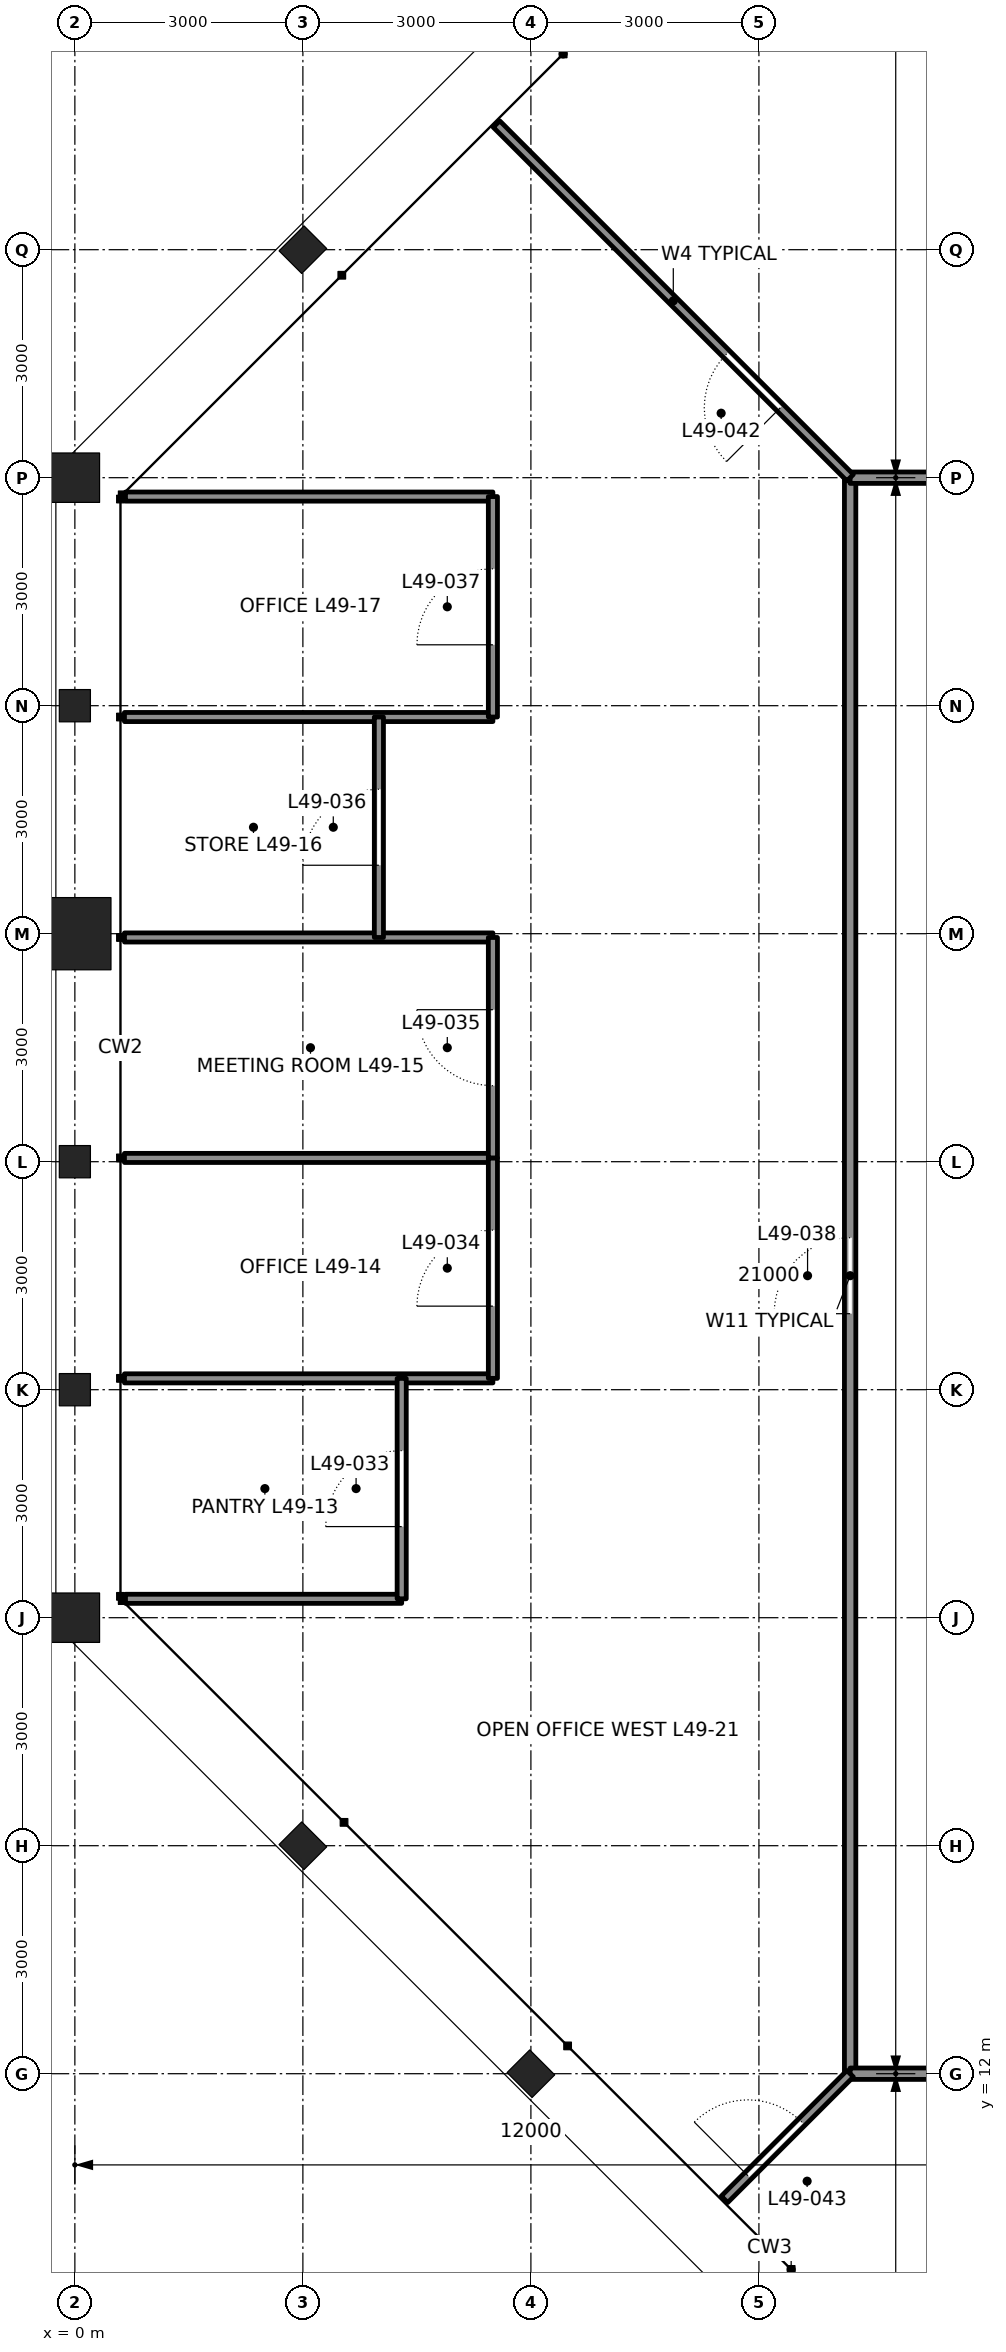
"""IFC4 building model, lengths in metres.
Left out: names, types, materials, properties, quantities, classifications, styles, units other than length and angle.
Written with IfcOpenShell. Run it as: python <this file> out.ifc"""

import sys

from ifc_helpers import new_model, si_unit, direction, frame, frame_2d, origin, origin_2d, place, context, subcontext, project, spatial, rectangle, hollow_rectangle, i_section, extrude, element, fill, save


model = new_model("IFC4")
c1 = context("Model", 3, precision=1e-05, world=origin(), true_north=direction((0.0, 1.0)))
c2 = subcontext(c1, "Body", "Model", "MODEL_VIEW")
j1 = project(units=[si_unit("LENGTHUNIT", "METRE"), si_unit("PLANEANGLEUNIT", "RADIAN")], contexts=[c1])
p1 = place(None, origin())
s1 = spatial("IfcSite", under=j1, at=p1, CompositionType="ELEMENT")
p2 = place(p1, origin())
s2 = spatial("IfcBuilding", under=s1, at=p2, CompositionType="ELEMENT")
p3 = place(p2, frame((0.0, 0.0, 222.3)))
s3 = spatial("IfcBuildingStorey", under=s2, at=p3, CompositionType="ELEMENT", Elevation=222.3)
p4 = place(p3, frame((3.0, 36.0, 0.0), z_axis=(0.0, 0.0, 1.0), x_axis=(-0.707106781187, 0.707106781187, 0.0)))
e1 = element("IfcColumn", 1, at=p4, inside=s3, PredefinedType="COLUMN", context=c2, shape_type="SweptSolid", body=[
    extrude(i_section(OverallWidth=0.422, OverallDepth=0.465, WebThickness=0.045, FlangeThickness=0.073, at=origin_2d()), origin(), (0.0, 0.0, 1.0), 4.2),
])
p5 = place(p3, frame((0.0, 33.0, 0.0), z_axis=(0.0, 0.0, 1.0), x_axis=(-1.0, 0.0, 0.0)))
e2 = element("IfcColumn", 2, at=p5, inside=s3, PredefinedType="COLUMN", context=c2, shape_type="SweptSolid", body=[
    extrude(hollow_rectangle(XDim=0.65, YDim=0.65, WallThickness=0.065, at=origin_2d()), origin(), (0.0, 0.0, 1.0), 4.2),
])
p6 = place(p3, frame((0.0, 30.0, 0.0), z_axis=(0.0, 0.0, 1.0), x_axis=(-1.0, 0.0, 0.0)))
e3 = element("IfcColumn", 3, at=p6, inside=s3, PredefinedType="COLUMN", context=c2, shape_type="SweptSolid", body=[
    extrude(i_section(OverallWidth=0.409, OverallDepth=0.424, WebThickness=0.033, FlangeThickness=0.052, at=origin_2d()), origin(), (0.0, 0.0, 1.0), 4.2),
])
p7 = place(p3, frame((0.0, 27.0, 0.0), z_axis=(0.0, 0.0, 1.0), x_axis=(-1.0, 0.0, 0.0)))
e4 = element("IfcColumn", 4, at=p7, inside=s3, PredefinedType="COLUMN", context=c2, shape_type="SweptSolid", body=[
    extrude(hollow_rectangle(XDim=0.95, YDim=0.95, WallThickness=0.11, at=origin_2d()), origin(), (0.0, 0.0, 1.0), 4.2),
])
for number, where, z_axis, x_axis in (
    (5, (0.0, 24.0, 0.0), (0.0, 0.0, 1.0), (-1.0, 0.0, 0.0)),
    (6, (0.0, 21.0, 0.0), (0.0, 0.0, 1.0), (-1.0, 0.0, 0.0)),
):
    element("IfcColumn", number, at=place(p3, frame(where, z_axis=z_axis, x_axis=x_axis)), inside=s3, PredefinedType="COLUMN", context=c2, shape_type="SweptSolid", body=[
        extrude(i_section(OverallWidth=0.409, OverallDepth=0.424, WebThickness=0.033, FlangeThickness=0.052, at=origin_2d()), origin(), (0.0, 0.0, 1.0), 4.2),
    ])
p8 = place(p3, frame((0.0, 18.0, 0.0), z_axis=(0.0, 0.0, 1.0), x_axis=(-1.0, 0.0, 0.0)))
e7 = element("IfcColumn", 7, at=p8, inside=s3, PredefinedType="COLUMN", context=c2, shape_type="SweptSolid", body=[
    extrude(hollow_rectangle(XDim=0.65, YDim=0.65, WallThickness=0.065, at=origin_2d()), origin(), (0.0, 0.0, 1.0), 4.2),
])
for number, where, z_axis, x_axis in (
    (8, (3.0, 15.0, 0.0), (0.0, 0.0, 1.0), (-0.707, -0.707, 0.0)),
    (9, (6.0, 12.0, 0.0), (0.0, 0.0, 1.0), (-0.707, -0.707, 0.0)),
):
    element("IfcColumn", number, at=place(p3, frame(where, z_axis=z_axis, x_axis=x_axis)), inside=s3, PredefinedType="COLUMN", context=c2, shape_type="SweptSolid", body=[
        extrude(i_section(OverallWidth=0.422, OverallDepth=0.465, WebThickness=0.045, FlangeThickness=0.073, at=origin_2d()), origin(), (0.0, 0.0, 1.0), 4.2),
    ])
p9 = place(p3, frame((0.666, 18.249, 0.0), z_axis=(0.0, 0.0, 1.0), x_axis=(1.0, 0.0, 0.0)))
e10 = element("IfcWall", 10, at=p9, inside=s3, PredefinedType="PARTITIONING", context=c2, shape_type="SweptSolid", body=[
    extrude(rectangle(XDim=3.634, YDim=0.12, at=frame_2d((1.817, 0.0))), origin(), (0.0, 0.0, 1.0), 4.04),
])
p10 = place(p3, frame((0.653, 21.149, 0.0), z_axis=(0.0, 0.0, 1.0), x_axis=(1.0, 0.0, 0.0)))
e11 = element("IfcWall", 11, at=p10, inside=s3, PredefinedType="PARTITIONING", context=c2, shape_type="SweptSolid", body=[
    extrude(rectangle(XDim=4.847, YDim=0.12, at=frame_2d((2.424, 0.0))), origin(), (0.0, 0.0, 1.0), 4.04),
])
for number, where, z_axis, x_axis in (
    (12, (0.653, 24.05, 0.0), (0.0, 0.0, 1.0), (1.0, 0.0, 0.0)),
    (13, (0.653, 26.95, 0.0), (0.0, 0.0, 1.0), (1.0, 0.0, 0.0)),
):
    element("IfcWall", number, at=place(p3, frame(where, z_axis=z_axis, x_axis=x_axis)), inside=s3, PredefinedType="PARTITIONING", context=c2, shape_type="SweptSolid", body=[
        extrude(rectangle(XDim=4.847, YDim=0.12, at=frame_2d((2.424, 0.0))), origin(), (0.0, 0.0, 1.0), 3.357),
    ])
p11 = place(p3, frame((0.653, 29.851, 0.0), z_axis=(0.0, 0.0, 1.0), x_axis=(1.0, 0.0, 0.0)))
e14 = element("IfcWall", 14, at=p11, inside=s3, PredefinedType="PARTITIONING", context=c2, shape_type="SweptSolid", body=[
    extrude(rectangle(XDim=4.847, YDim=0.12, at=frame_2d((2.424, 0.0))), origin(), (0.0, 0.0, 1.0), 4.04),
])
p12 = place(p3, frame((0.666, 32.751, 0.0), z_axis=(0.0, 0.0, 1.0), x_axis=(1.0, 0.0, 0.0)))
e15 = element("IfcWall", 15, at=p12, inside=s3, PredefinedType="PARTITIONING", context=c2, shape_type="SweptSolid", body=[
    extrude(rectangle(XDim=4.834, YDim=0.12, at=frame_2d((2.417, 0.0))), origin(), (0.0, 0.0, 1.0), 4.04),
])
p13 = place(p3, frame((4.3, 18.249, 0.0), z_axis=(0.0, 0.0, 1.0), x_axis=(0.0, 1.0, 0.0)))
e16 = element("IfcWall", 16, at=p13, inside=s3, PredefinedType="PARTITIONING", context=c2, shape_type="SweptSolid", body=[
    extrude(rectangle(XDim=2.901, YDim=0.12, at=frame_2d((1.45, 0.0))), origin(), (0.0, 0.0, 1.0), 4.04),
])
p14 = place(p13, frame((0.95, 0.0, 0.0)))
e17 = element("IfcOpeningElement", 17, at=p14, cuts=e16, PredefinedType="OPENING", context=c2, shape_type="SweptSolid", body=[
    extrude(rectangle(XDim=1.0, YDim=2.4, at=frame_2d((0.5, 1.2))), frame((0.0, 0.07, 0.0), z_axis=(0.0, -1.0, 0.0), x_axis=(1.0, 0.0, 0.0)), (0.0, 0.0, 1.0), 0.14),
])
p15 = place(p3, frame((5.5, 21.149, 0.0), z_axis=(0.0, 0.0, 1.0), x_axis=(0.0, 1.0, 0.0)))
e18 = element("IfcWall", 18, at=p15, inside=s3, PredefinedType="PARTITIONING", context=c2, shape_type="SweptSolid", body=[
    extrude(rectangle(XDim=2.901, YDim=0.12, at=frame_2d((1.45, 0.0))), origin(), (0.0, 0.0, 1.0), 4.04),
])
p16 = place(p15, frame((0.95, 0.0, 0.0)))
e19 = element("IfcOpeningElement", 19, at=p16, cuts=e18, PredefinedType="OPENING", context=c2, shape_type="SweptSolid", body=[
    extrude(rectangle(XDim=1.0, YDim=2.4, at=frame_2d((0.5, 1.2))), frame((0.0, 0.07, 0.0), z_axis=(0.0, -1.0, 0.0), x_axis=(1.0, 0.0, 0.0)), (0.0, 0.0, 1.0), 0.14),
])
p17 = place(p3, frame((5.5, 24.05, 0.0), z_axis=(0.0, 0.0, 1.0), x_axis=(0.0, 1.0, 0.0)))
e20 = element("IfcWall", 20, at=p17, inside=s3, PredefinedType="PARTITIONING", context=c2, shape_type="SweptSolid", body=[
    extrude(rectangle(XDim=2.9, YDim=0.12, at=frame_2d((1.45, 0.0))), origin(), (0.0, 0.0, 1.0), 4.04),
])
p18 = place(p17, frame((0.95, 0.0, 0.0)))
e21 = element("IfcOpeningElement", 21, at=p18, cuts=e20, PredefinedType="OPENING", context=c2, shape_type="SweptSolid", body=[
    extrude(rectangle(XDim=1.0, YDim=2.4, at=frame_2d((0.5, 1.2))), frame((0.0, 0.07, 0.0), z_axis=(0.0, -1.0, 0.0), x_axis=(1.0, 0.0, 0.0)), (0.0, 0.0, 1.0), 0.14),
])
p19 = place(p3, frame((4.0, 26.95, 0.0), z_axis=(0.0, 0.0, 1.0), x_axis=(0.0, 1.0, 0.0)))
e22 = element("IfcWall", 22, at=p19, inside=s3, PredefinedType="PARTITIONING", context=c2, shape_type="SweptSolid", body=[
    extrude(rectangle(XDim=2.901, YDim=0.12, at=frame_2d((1.45, 0.0))), origin(), (0.0, 0.0, 1.0), 4.04),
])
p20 = place(p19, frame((0.95, 0.0, 0.0)))
e23 = element("IfcOpeningElement", 23, at=p20, cuts=e22, PredefinedType="OPENING", context=c2, shape_type="SweptSolid", body=[
    extrude(rectangle(XDim=1.0, YDim=2.4, at=frame_2d((0.5, 1.2))), frame((0.0, 0.07, 0.0), z_axis=(0.0, -1.0, 0.0), x_axis=(1.0, 0.0, 0.0)), (0.0, 0.0, 1.0), 0.14),
])
p21 = place(p3, frame((5.5, 29.851, 0.0), z_axis=(0.0, 0.0, 1.0), x_axis=(0.0, 1.0, 0.0)))
e24 = element("IfcWall", 24, at=p21, inside=s3, PredefinedType="PARTITIONING", context=c2, shape_type="SweptSolid", body=[
    extrude(rectangle(XDim=2.901, YDim=0.12, at=frame_2d((1.45, 0.0))), origin(), (0.0, 0.0, 1.0), 4.04),
])
p22 = place(p21, frame((0.95, 0.0, 0.0)))
e25 = element("IfcOpeningElement", 25, at=p22, cuts=e24, PredefinedType="OPENING", context=c2, shape_type="SweptSolid", body=[
    extrude(rectangle(XDim=1.0, YDim=2.4, at=frame_2d((0.5, 1.2))), frame((0.0, 0.07, 0.0), z_axis=(0.0, -1.0, 0.0), x_axis=(1.0, 0.0, 0.0)), (0.0, 0.0, 1.0), 0.14),
])
p23 = place(p3, frame((10.2, 12.0, 0.0), z_axis=(0.0, 0.0, 1.0), x_axis=(0.0, 1.0, 0.0)))
e26 = element("IfcWall", 26, at=p23, inside=s3, PredefinedType="PARTITIONING", context=c2, shape_type="SweptSolid", body=[
    extrude(rectangle(XDim=21.0, YDim=0.15, at=frame_2d((10.5, 0.0))), origin(), (0.0, 0.0, 1.0), 4.04),
])
p24 = place(p23, frame((10.0, 0.0, 0.0)))
e27 = element("IfcOpeningElement", 27, at=p24, cuts=e26, PredefinedType="OPENING", context=c2, shape_type="SweptSolid", body=[
    extrude(rectangle(XDim=1.0, YDim=2.4, at=frame_2d((0.5, 1.2))), frame((0.0, 0.085, 0.0), z_axis=(0.0, -1.0, 0.0), x_axis=(1.0, 0.0, 0.0)), (0.0, 0.0, 1.0), 0.17),
])
for number, where, z_axis, x_axis in (
    (28, (10.2, 33.0, 0.0), (0.0, 0.0, 1.0), (1.0, 0.0, 0.0)),
    (29, (10.2, 12.0, 0.0), (0.0, 0.0, 1.0), (1.0, 0.0, 0.0)),
):
    element("IfcWall", number, at=place(p3, frame(where, z_axis=z_axis, x_axis=x_axis)), inside=s3, PredefinedType="PARTITIONING", context=c2, shape_type="SweptSolid", body=[
        extrude(rectangle(XDim=1.8, YDim=0.15, at=frame_2d((0.9, 0.0))), origin(), (0.0, 0.0, 1.0), 3.27),
    ])
p25 = place(p3, frame((10.2, 33.0, 0.0), z_axis=(0.0, 0.0, 1.0), x_axis=(-0.707106781187, 0.707106781187, 0.0)))
e30 = element("IfcWall", 30, at=p25, inside=s3, PredefinedType="PARTITIONING", context=c2, shape_type="SweptSolid", body=[
    extrude(rectangle(XDim=6.58, YDim=0.12, at=frame_2d((3.29, 0.0))), origin(), (0.0, 0.0, 1.0), 4.04),
])
p26 = place(p25, frame((1.3, 0.0, 0.0)))
e31 = element("IfcOpeningElement", 31, at=p26, cuts=e30, PredefinedType="OPENING", context=c2, shape_type="SweptSolid", body=[
    extrude(rectangle(XDim=1.0, YDim=2.4, at=frame_2d((0.5, 1.2))), frame((0.0, 0.07, 0.0), z_axis=(0.0, -1.0, 0.0), x_axis=(1.0, 0.0, 0.0)), (0.0, 0.0, 1.0), 0.14),
])
p27 = place(p3, frame((10.2, 12.0, 0.0), z_axis=(0.0, 0.0, 1.0), x_axis=(-0.707106781187, -0.707106781187, 0.0)))
e32 = element("IfcWall", 32, at=p27, inside=s3, PredefinedType="PARTITIONING", context=c2, shape_type="SweptSolid", body=[
    extrude(rectangle(XDim=2.338, YDim=0.12, at=frame_2d((1.169, 0.0))), origin(), (0.0, 0.0, 1.0), 4.04),
])
p28 = place(p27, frame((0.9, 0.0, 0.0)))
e33 = element("IfcOpeningElement", 33, at=p28, cuts=e32, PredefinedType="OPENING", context=c2, shape_type="SweptSolid", body=[
    extrude(rectangle(XDim=1.0, YDim=2.4, at=frame_2d((0.5, 1.2))), frame((0.0, 0.07, 0.0), z_axis=(0.0, -1.0, 0.0), x_axis=(1.0, 0.0, 0.0)), (0.0, 0.0, 1.0), 0.14),
])
p29 = place(p14, origin())
e34 = element("IfcDoor", 34, at=p29, inside=s3, OperationType="SINGLE_SWING_LEFT", PredefinedType="DOOR", context=c2, shape_type="SweptSolid", body=[
    extrude(rectangle(XDim=1.0, YDim=2.4, at=frame_2d((0.5, 1.2))), frame((0.0, 0.025, 0.0), z_axis=(0.0, -1.0, 0.0), x_axis=(1.0, 0.0, 0.0)), (0.0, 0.0, 1.0), 0.05),
])
fill(e17, e34)
p30 = place(p16, origin())
e35 = element("IfcDoor", 35, at=p30, inside=s3, OperationType="SINGLE_SWING_LEFT", PredefinedType="DOOR", context=c2, shape_type="SweptSolid", body=[
    extrude(rectangle(XDim=1.0, YDim=2.4, at=frame_2d((0.5, 1.2))), frame((0.0, 0.025, 0.0), z_axis=(0.0, -1.0, 0.0), x_axis=(1.0, 0.0, 0.0)), (0.0, 0.0, 1.0), 0.05),
])
fill(e19, e35)
p31 = place(p18, origin())
e36 = element("IfcDoor", 36, at=p31, inside=s3, OperationType="SINGLE_SWING_RIGHT", PredefinedType="DOOR", context=c2, shape_type="SweptSolid", body=[
    extrude(rectangle(XDim=1.0, YDim=2.4, at=frame_2d((0.5, 1.2))), frame((0.0, 0.025, 0.0), z_axis=(0.0, -1.0, 0.0), x_axis=(1.0, 0.0, 0.0)), (0.0, 0.0, 1.0), 0.05),
])
fill(e21, e36)
p32 = place(p20, origin())
e37 = element("IfcDoor", 37, at=p32, inside=s3, OperationType="SINGLE_SWING_LEFT", PredefinedType="DOOR", context=c2, shape_type="SweptSolid", body=[
    extrude(rectangle(XDim=1.0, YDim=2.4, at=frame_2d((0.5, 1.2))), frame((0.0, 0.025, 0.0), z_axis=(0.0, -1.0, 0.0), x_axis=(1.0, 0.0, 0.0)), (0.0, 0.0, 1.0), 0.05),
])
fill(e23, e37)
p33 = place(p22, origin())
e38 = element("IfcDoor", 38, at=p33, inside=s3, OperationType="SINGLE_SWING_LEFT", PredefinedType="DOOR", context=c2, shape_type="SweptSolid", body=[
    extrude(rectangle(XDim=1.0, YDim=2.4, at=frame_2d((0.5, 1.2))), frame((0.0, 0.025, 0.0), z_axis=(0.0, -1.0, 0.0), x_axis=(1.0, 0.0, 0.0)), (0.0, 0.0, 1.0), 0.05),
])
fill(e25, e38)
p34 = place(p24, origin())
e39 = element("IfcDoor", 39, at=p34, inside=s3, OperationType="SINGLE_SWING_LEFT", PredefinedType="DOOR", context=c2, shape_type="SweptSolid", body=[
    extrude(rectangle(XDim=1.0, YDim=2.4, at=frame_2d((0.5, 1.2))), frame((0.0, 0.025, 0.0), z_axis=(0.0, -1.0, 0.0), x_axis=(1.0, 0.0, 0.0)), (0.0, 0.0, 1.0), 0.05),
])
fill(e27, e39)
p35 = place(p26, origin())
e40 = element("IfcDoor", 40, at=p35, inside=s3, OperationType="SINGLE_SWING_LEFT", PredefinedType="DOOR", context=c2, shape_type="SweptSolid", body=[
    extrude(rectangle(XDim=1.0, YDim=2.4, at=frame_2d((0.5, 1.2))), frame((0.0, 0.025, 0.0), z_axis=(0.0, -1.0, 0.0), x_axis=(1.0, 0.0, 0.0)), (0.0, 0.0, 1.0), 0.05),
])
fill(e31, e40)
p36 = place(p28, frame((1.0, 0.0, 0.0), z_axis=(0.0, 0.0, 1.0), x_axis=(-1.0, 0.0, 0.0)))
e41 = element("IfcDoor", 41, at=p36, inside=s3, OperationType="SINGLE_SWING_LEFT", PredefinedType="DOOR", context=c2, shape_type="SweptSolid", body=[
    extrude(rectangle(XDim=1.0, YDim=2.4, at=frame_2d((0.5, 1.2))), frame((0.0, 0.025, 0.0), z_axis=(0.0, -1.0, 0.0), x_axis=(1.0, 0.0, 0.0)), (0.0, 0.0, 1.0), 0.05),
])
fill(e33, e41)
save(model, sys.argv[1])
